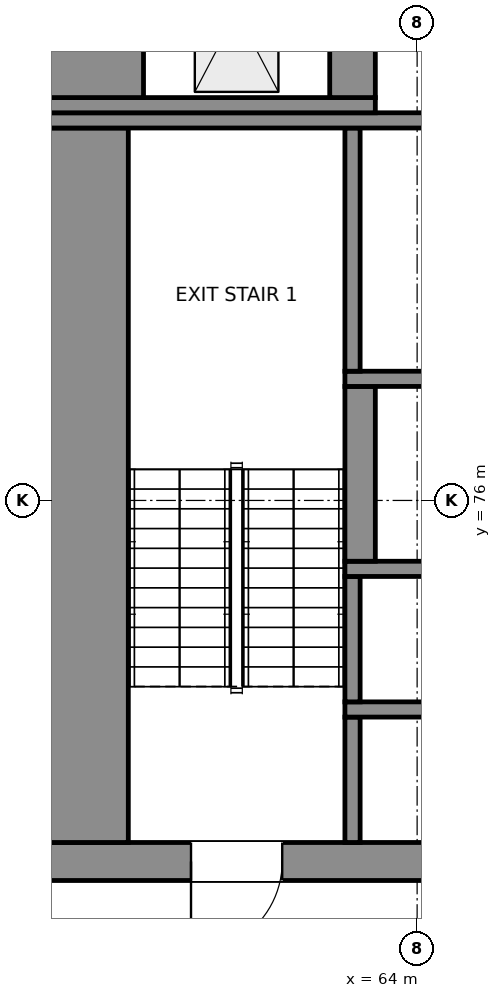
"""IFC4 building model, lengths in metres.
Left out: names, types, materials, properties, quantities, classifications, styles, units other than length and angle.
Written with IfcOpenShell. Run it as: python <this file> out.ifc"""

import sys

from ifc_helpers import new_model, si_unit, direction, frame, frame_2d, origin, place, context, subcontext, project, spatial, rectangle, extrude, element, fill, save


model = new_model("IFC4")
c1 = context("Model", 3, precision=1e-05, world=origin(), true_north=direction((0.0, 1.0)))
c2 = subcontext(c1, "Body", "Model", "MODEL_VIEW")
j1 = project(units=[si_unit("LENGTHUNIT", "METRE"), si_unit("PLANEANGLEUNIT", "RADIAN")], contexts=[c1])
p1 = place(None, origin())
s1 = spatial("IfcSite", under=j1, at=p1, CompositionType="ELEMENT")
p2 = place(p1, origin())
s2 = spatial("IfcBuilding", under=s1, at=p2, CompositionType="ELEMENT")
p3 = place(p2, frame((0.0, 0.0, 333.2)))
s3 = spatial("IfcBuildingStorey", under=s2, at=p3, CompositionType="ELEMENT", Elevation=333.2)
p4 = place(p3, frame((59.0, 71.25, 0.0), z_axis=(0.0, 0.0, 1.0), x_axis=(1.0, 0.0, 0.0)))
e1 = element("IfcWall", 1, at=p4, inside=s3, PredefinedType="SHEAR", context=c2, shape_type="SweptSolid", body=[
    extrude(rectangle(XDim=22.0, YDim=0.5, at=frame_2d((11.0, 0.0))), origin(), (0.0, 0.0, 1.0), 4.5),
])
p5 = place(p4, frame((2.025, 0.0, 0.0)))
e2 = element("IfcOpeningElement", 2, at=p5, cuts=e1, PredefinedType="OPENING", context=c2, shape_type="SweptSolid", body=[
    extrude(rectangle(XDim=1.2, YDim=2.1, at=frame_2d((0.6, 1.05))), frame((0.0, 0.26, 0.0), z_axis=(0.0, -1.0, 0.0), x_axis=(1.0, 0.0, 0.0)), (0.0, 0.0, 1.0), 0.52),
])
p6 = place(p4, frame((18.775, 0.0, 0.0)))
e3 = element("IfcOpeningElement", 3, at=p6, cuts=e1, PredefinedType="OPENING", context=c2, shape_type="SweptSolid", body=[
    extrude(rectangle(XDim=1.2, YDim=2.1, at=frame_2d((0.6, 1.05))), frame((0.0, 0.26, 0.0), z_axis=(0.0, -1.0, 0.0), x_axis=(1.0, 0.0, 0.0)), (0.0, 0.0, 1.0), 0.52),
])
p7 = place(p4, frame((10.0, 0.0, 0.0)))
e4 = element("IfcOpeningElement", 4, at=p7, cuts=e1, PredefinedType="OPENING", context=c2, shape_type="SweptSolid", body=[
    extrude(rectangle(XDim=2.0, YDim=2.1, at=frame_2d((1.0, 1.05))), frame((0.0, 0.26, 0.0), z_axis=(0.0, -1.0, 0.0), x_axis=(1.0, 0.0, 0.0)), (0.0, 0.0, 1.0), 0.52),
])
p8 = place(p3, frame((59.6, 71.5, 0.0), z_axis=(0.0, 0.0, 1.0), x_axis=(0.0, 1.0, 0.0)))
e5 = element("IfcWall", 5, at=p8, inside=s3, PredefinedType="SHEAR", context=c2, shape_type="SweptSolid", body=[
    extrude(rectangle(XDim=9.4, YDim=1.2, at=frame_2d((4.7, 0.0))), origin(), (0.0, 0.0, 1.0), 4.5),
])
p9 = place(p3, frame((63.15, 71.5, 0.0), z_axis=(0.0, 0.0, 1.0), x_axis=(0.0, 1.0, 0.0)))
e6 = element("IfcWall", 6, at=p9, inside=s3, PredefinedType="SHEAR", context=c2, shape_type="SweptSolid", body=[
    extrude(rectangle(XDim=1.65, YDim=0.2, at=frame_2d((0.825, 0.0))), origin(), (0.0, 0.0, 1.0), 4.5),
])
p10 = place(p3, frame((63.05, 73.25, 0.0), z_axis=(0.0, 0.0, 1.0), x_axis=(1.0, 0.0, 0.0)))
e7 = element("IfcWall", 7, at=p10, inside=s3, PredefinedType="SHEAR", context=c2, shape_type="SweptSolid", body=[
    extrude(rectangle(XDim=5.7, YDim=0.2, at=frame_2d((2.85, 0.0))), origin(), (0.0, 0.0, 1.0), 4.5),
])
p11 = place(p3, frame((63.15, 73.35, 0.0), z_axis=(0.0, 0.0, 1.0), x_axis=(0.0, 1.0, 0.0)))
e8 = element("IfcWall", 8, at=p11, inside=s3, PredefinedType="SHEAR", context=c2, shape_type="SweptSolid", body=[
    extrude(rectangle(XDim=1.65, YDim=0.2, at=frame_2d((0.825, 0.0))), origin(), (0.0, 0.0, 1.0), 4.5),
])
p12 = place(p3, frame((63.05, 75.1, 0.0), z_axis=(0.0, 0.0, 1.0), x_axis=(1.0, 0.0, 0.0)))
e9 = element("IfcWall", 9, at=p12, inside=s3, PredefinedType="SHEAR", context=c2, shape_type="SweptSolid", body=[
    extrude(rectangle(XDim=5.7, YDim=0.2, at=frame_2d((2.85, 0.0))), origin(), (0.0, 0.0, 1.0), 4.5),
])
p13 = place(p3, frame((63.25, 75.2, 0.0), z_axis=(0.0, 0.0, 1.0), x_axis=(0.0, 1.0, 0.0)))
e10 = element("IfcWall", 10, at=p13, inside=s3, PredefinedType="SHEAR", context=c2, shape_type="SweptSolid", body=[
    extrude(rectangle(XDim=2.3, YDim=0.4, at=frame_2d((1.15, 0.0))), origin(), (0.0, 0.0, 1.0), 4.5),
])
p14 = place(p3, frame((63.05, 77.6, 0.0), z_axis=(0.0, 0.0, 1.0), x_axis=(1.0, 0.0, 0.0)))
e11 = element("IfcWall", 11, at=p14, inside=s3, PredefinedType="SHEAR", context=c2, shape_type="SweptSolid", body=[
    extrude(rectangle(XDim=5.7, YDim=0.2, at=frame_2d((2.85, 0.0))), origin(), (0.0, 0.0, 1.0), 4.5),
])
p15 = place(p14, frame((2.5, 0.0, 0.0)))
e12 = element("IfcOpeningElement", 12, at=p15, cuts=e11, PredefinedType="OPENING", context=c2, shape_type="SweptSolid", body=[
    extrude(rectangle(XDim=0.9, YDim=2.1, at=frame_2d((0.45, 1.05))), frame((0.0, 0.11, 0.0), z_axis=(0.0, -1.0, 0.0), x_axis=(1.0, 0.0, 0.0)), (0.0, 0.0, 1.0), 0.22),
])
p16 = place(p3, frame((63.15, 77.7, 0.0), z_axis=(0.0, 0.0, 1.0), x_axis=(0.0, 1.0, 0.0)))
e13 = element("IfcWall", 13, at=p16, inside=s3, PredefinedType="SHEAR", context=c2, shape_type="SweptSolid", body=[
    extrude(rectangle(XDim=3.2, YDim=0.2, at=frame_2d((1.6, 0.0))), origin(), (0.0, 0.0, 1.0), 4.5),
])
p17 = place(p3, frame((59.0, 81.0, 0.0), z_axis=(0.0, 0.0, 1.0), x_axis=(1.0, 0.0, 0.0)))
e14 = element("IfcWall", 14, at=p17, inside=s3, PredefinedType="SHEAR", context=c2, shape_type="SweptSolid", body=[
    extrude(rectangle(XDim=22.0, YDim=0.2, at=frame_2d((11.0, 0.0))), origin(), (0.0, 0.0, 1.0), 4.5),
])
p18 = place(p17, frame((11.85, 0.0, 0.0)))
e15 = element("IfcOpeningElement", 15, at=p18, cuts=e14, PredefinedType="OPENING", context=c2, shape_type="SweptSolid", body=[
    extrude(rectangle(XDim=0.9, YDim=2.1, at=frame_2d((0.45, 1.05))), frame((0.0, 0.11, 0.0), z_axis=(0.0, -1.0, 0.0), x_axis=(1.0, 0.0, 0.0)), (0.0, 0.0, 1.0), 0.22),
])
p19 = place(p17, frame((15.825, 0.0, 0.0)))
e16 = element("IfcOpeningElement", 16, at=p19, cuts=e14, PredefinedType="OPENING", context=c2, shape_type="SweptSolid", body=[
    extrude(rectangle(XDim=0.9, YDim=2.1, at=frame_2d((0.45, 1.05))), frame((0.0, 0.11, 0.0), z_axis=(0.0, -1.0, 0.0), x_axis=(1.0, 0.0, 0.0)), (0.0, 0.0, 1.0), 0.22),
])
p20 = place(p3, frame((59.0, 81.2, 0.0), z_axis=(0.0, 0.0, 1.0), x_axis=(1.0, 0.0, 0.0)))
e17 = element("IfcWall", 17, at=p20, inside=s3, PredefinedType="SHEAR", context=c2, shape_type="SweptSolid", body=[
    extrude(rectangle(XDim=4.45, YDim=0.2, at=frame_2d((2.225, 0.0))), origin(), (0.0, 0.0, 1.0), 4.5),
])
p21 = place(p3, frame((59.7, 81.3, 0.0), z_axis=(0.0, 0.0, 1.0), x_axis=(0.0, 1.0, 0.0)))
e18 = element("IfcWall", 18, at=p21, inside=s3, PredefinedType="SHEAR", context=c2, shape_type="SweptSolid", body=[
    extrude(rectangle(XDim=2.25, YDim=1.4, at=frame_2d((1.125, 0.0))), origin(), (0.0, 0.0, 1.0), 4.5),
])
p22 = place(p3, frame((63.15, 81.3, 0.0), z_axis=(0.0, 0.0, 1.0), x_axis=(0.0, 1.0, 0.0)))
e19 = element("IfcWall", 19, at=p22, inside=s3, PredefinedType="SHEAR", context=c2, shape_type="SweptSolid", body=[
    extrude(rectangle(XDim=2.25, YDim=0.6, at=frame_2d((1.125, 0.0))), origin(), (0.0, 0.0, 1.0), 4.5),
])
p23 = place(p5, frame((1.2, 0.0, 0.0), z_axis=(0.0, 0.0, 1.0), x_axis=(-1.0, 0.0, 0.0)))
e20 = element("IfcDoor", 20, at=p23, inside=s3, OperationType="SINGLE_SWING_RIGHT", PredefinedType="DOOR", context=c2, shape_type="SweptSolid", body=[
    extrude(rectangle(XDim=1.2, YDim=2.1, at=frame_2d((0.6, 1.05))), frame((0.0, 0.025, 0.0), z_axis=(0.0, -1.0, 0.0), x_axis=(1.0, 0.0, 0.0)), (0.0, 0.0, 1.0), 0.05),
])
fill(e2, e20)
save(model, sys.argv[1])
